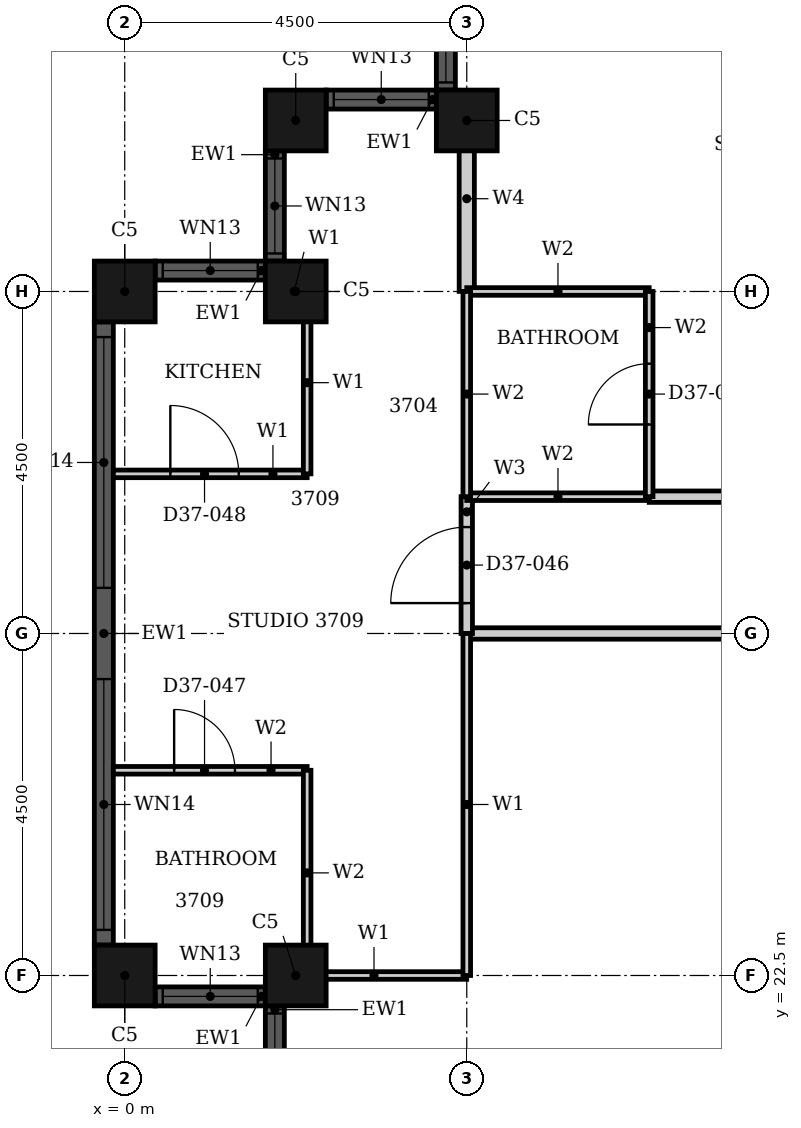
"""IFC4 building model, lengths in metres.
Left out: names, types, materials, properties, quantities, classifications, styles, units other than length and angle.
Written with IfcOpenShell. Run it as: python <this file> out.ifc"""

import sys

from ifc_helpers import new_model, si_unit, direction, frame, frame_2d, origin, origin_2d, place, context, subcontext, project, spatial, rectangle, hollow_rectangle, extrude, element, fill, save


model = new_model("IFC4")
c1 = context("Model", 3, precision=1e-05, world=origin(), true_north=direction((0.0, 1.0)))
c2 = subcontext(c1, "Body", "Model", "MODEL_VIEW")
j1 = project(units=[si_unit("LENGTHUNIT", "METRE"), si_unit("PLANEANGLEUNIT", "RADIAN")], contexts=[c1])
p1 = place(None, origin())
s1 = spatial("IfcSite", under=j1, at=p1, CompositionType="ELEMENT")
p2 = place(p1, origin())
s2 = spatial("IfcBuilding", under=s1, at=p2, CompositionType="ELEMENT")
p3 = place(p2, frame((0.0, 0.0, 150.6)))
s3 = spatial("IfcBuildingStorey", under=s2, at=p3, CompositionType="ELEMENT", Elevation=150.6)
for number, where, z_axis, x_axis in (
    (1, (4.5, 33.75, 0.0), (0.0, 0.0, 1.0), (1.0, 0.0, 0.0)),
    (2, (2.25, 33.75, 0.0), (0.0, 0.0, 1.0), (1.0, 0.0, 0.0)),
    (3, (2.25, 31.5, 0.0), (0.0, 0.0, 1.0), (1.0, 0.0, 0.0)),
    (4, (0.0, 31.5, 0.0), (0.0, 0.0, 1.0), (1.0, 0.0, 0.0)),
    (5, (0.0, 22.5, 0.0), (0.0, 0.0, 1.0), (1.0, 0.0, 0.0)),
    (6, (2.25, 22.5, 0.0), (0.0, 0.0, 1.0), (1.0, 0.0, 0.0)),
):
    element("IfcColumn", number, at=place(p3, frame(where, z_axis=z_axis, x_axis=x_axis)), inside=s3, PredefinedType="COLUMN", context=c2, shape_type="SweptSolid", body=[
        extrude(hollow_rectangle(XDim=0.8, YDim=0.8, WallThickness=0.025, at=origin_2d()), origin(), (0.0, 0.0, 1.0), 3.7),
    ])
p4 = place(p3, frame((4.225, 35.6, 0.0), z_axis=(0.0, 0.0, 1.0), x_axis=(0.0, -1.0, 0.0)))
e7 = element("IfcWall", 7, at=p4, inside=s3, PredefinedType="SOLIDWALL", context=c2, shape_type="SweptSolid", body=[
    extrude(rectangle(XDim=1.45, YDim=0.25, at=frame_2d((0.725, 0.0))), origin(), (0.0, 0.0, 1.0), 3.7),
])
p5 = place(p4, frame((0.1, 0.0, 0.9)))
e8 = element("IfcOpeningElement", 8, at=p5, cuts=e7, PredefinedType="OPENING", context=c2, shape_type="SweptSolid", body=[
    extrude(rectangle(XDim=1.25, YDim=2.08, at=frame_2d((0.625, 1.04))), frame((0.0, 0.135, 0.0), z_axis=(0.0, -1.0, 0.0), x_axis=(1.0, 0.0, 0.0)), (0.0, 0.0, 1.0), 0.27),
])
p6 = place(p3, frame((4.1, 34.025, 0.0), z_axis=(0.0, 0.0, 1.0), x_axis=(-1.0, 0.0, 0.0)))
e9 = element("IfcWall", 9, at=p6, inside=s3, PredefinedType="SOLIDWALL", context=c2, shape_type="SweptSolid", body=[
    extrude(rectangle(XDim=1.45, YDim=0.25, at=frame_2d((0.725, 0.0))), origin(), (0.0, 0.0, 1.0), 3.7),
])
p7 = place(p6, frame((0.1, 0.0, 0.9)))
e10 = element("IfcOpeningElement", 10, at=p7, cuts=e9, PredefinedType="OPENING", context=c2, shape_type="SweptSolid", body=[
    extrude(rectangle(XDim=1.25, YDim=1.85, at=frame_2d((0.625, 0.925))), frame((0.0, 0.135, 0.0), z_axis=(0.0, -1.0, 0.0), x_axis=(1.0, 0.0, 0.0)), (0.0, 0.0, 1.0), 0.27),
])
p8 = place(p3, frame((1.975, 33.35, 0.0), z_axis=(0.0, 0.0, 1.0), x_axis=(0.0, -1.0, 0.0)))
e11 = element("IfcWall", 11, at=p8, inside=s3, PredefinedType="SOLIDWALL", context=c2, shape_type="SweptSolid", body=[
    extrude(rectangle(XDim=1.45, YDim=0.25, at=frame_2d((0.725, 0.0))), origin(), (0.0, 0.0, 1.0), 3.7),
])
p9 = place(p8, frame((0.1, 0.0, 0.9)))
e12 = element("IfcOpeningElement", 12, at=p9, cuts=e11, PredefinedType="OPENING", context=c2, shape_type="SweptSolid", body=[
    extrude(rectangle(XDim=1.25, YDim=1.85, at=frame_2d((0.625, 0.925))), frame((0.0, 0.135, 0.0), z_axis=(0.0, -1.0, 0.0), x_axis=(1.0, 0.0, 0.0)), (0.0, 0.0, 1.0), 0.27),
])
p10 = place(p3, frame((1.85, 31.775, 0.0), z_axis=(0.0, 0.0, 1.0), x_axis=(-1.0, 0.0, 0.0)))
e13 = element("IfcWall", 13, at=p10, inside=s3, PredefinedType="SOLIDWALL", context=c2, shape_type="SweptSolid", body=[
    extrude(rectangle(XDim=1.45, YDim=0.25, at=frame_2d((0.725, 0.0))), origin(), (0.0, 0.0, 1.0), 3.7),
])
p11 = place(p10, frame((0.1, 0.0, 0.9)))
e14 = element("IfcOpeningElement", 14, at=p11, cuts=e13, PredefinedType="OPENING", context=c2, shape_type="SweptSolid", body=[
    extrude(rectangle(XDim=1.25, YDim=1.85, at=frame_2d((0.625, 0.925))), frame((0.0, 0.135, 0.0), z_axis=(0.0, -1.0, 0.0), x_axis=(1.0, 0.0, 0.0)), (0.0, 0.0, 1.0), 0.27),
])
p12 = place(p3, frame((-0.275, 31.1, 0.0), z_axis=(0.0, 0.0, 1.0), x_axis=(0.0, -1.0, 0.0)))
e15 = element("IfcWall", 15, at=p12, inside=s3, PredefinedType="SOLIDWALL", context=c2, shape_type="SweptSolid", body=[
    extrude(rectangle(XDim=8.2, YDim=0.25, at=frame_2d((4.1, 0.0))), origin(), (0.0, 0.0, 1.0), 3.7),
])
p13 = place(p12, frame((0.2, 0.0, 0.45)))
e16 = element("IfcOpeningElement", 16, at=p13, cuts=e15, PredefinedType="OPENING", context=c2, shape_type="SweptSolid", body=[
    extrude(rectangle(XDim=3.3, YDim=2.53, at=frame_2d((1.65, 1.265))), frame((0.0, 0.135, 0.0), z_axis=(0.0, -1.0, 0.0), x_axis=(1.0, 0.0, 0.0)), (0.0, 0.0, 1.0), 0.27),
])
p14 = place(p12, frame((4.7, 0.0, 0.45)))
e17 = element("IfcOpeningElement", 17, at=p14, cuts=e15, PredefinedType="OPENING", context=c2, shape_type="SweptSolid", body=[
    extrude(rectangle(XDim=3.3, YDim=2.53, at=frame_2d((1.65, 1.265))), frame((0.0, 0.135, 0.0), z_axis=(0.0, -1.0, 0.0), x_axis=(1.0, 0.0, 0.0)), (0.0, 0.0, 1.0), 0.27),
])
p15 = place(p3, frame((0.4, 22.225, 0.0), z_axis=(0.0, 0.0, 1.0), x_axis=(1.0, 0.0, 0.0)))
e18 = element("IfcWall", 18, at=p15, inside=s3, PredefinedType="SOLIDWALL", context=c2, shape_type="SweptSolid", body=[
    extrude(rectangle(XDim=1.45, YDim=0.25, at=frame_2d((0.725, 0.0))), origin(), (0.0, 0.0, 1.0), 3.7),
])
p16 = place(p15, frame((0.1, 0.0, 0.9)))
e19 = element("IfcOpeningElement", 19, at=p16, cuts=e18, PredefinedType="OPENING", context=c2, shape_type="SweptSolid", body=[
    extrude(rectangle(XDim=1.25, YDim=1.85, at=frame_2d((0.625, 0.925))), frame((0.0, 0.135, 0.0), z_axis=(0.0, -1.0, 0.0), x_axis=(1.0, 0.0, 0.0)), (0.0, 0.0, 1.0), 0.27),
])
p17 = place(p3, frame((1.975, 22.1, 0.0), z_axis=(0.0, 0.0, 1.0), x_axis=(0.0, -1.0, 0.0)))
e20 = element("IfcWall", 20, at=p17, inside=s3, PredefinedType="SOLIDWALL", context=c2, shape_type="SweptSolid", body=[
    extrude(rectangle(XDim=1.45, YDim=0.25, at=frame_2d((0.725, 0.0))), origin(), (0.0, 0.0, 1.0), 3.7),
])
p18 = place(p17, frame((0.1, 0.0, 0.9)))
e21 = element("IfcOpeningElement", 21, at=p18, cuts=e20, PredefinedType="OPENING", context=c2, shape_type="SweptSolid", body=[
    extrude(rectangle(XDim=1.25, YDim=1.85, at=frame_2d((0.625, 0.925))), frame((0.0, 0.135, 0.0), z_axis=(0.0, -1.0, 0.0), x_axis=(1.0, 0.0, 0.0)), (0.0, 0.0, 1.0), 0.27),
])
p19 = place(p3, frame((4.5, 27.0, 0.0), z_axis=(0.0, 0.0, 1.0), x_axis=(1.0, 0.0, 0.0)))
e22 = element("IfcWall", 22, at=p19, inside=s3, PredefinedType="PARTITIONING", context=c2, shape_type="SweptSolid", body=[
    extrude(rectangle(XDim=13.5, YDim=0.15, at=frame_2d((6.75, 0.0))), origin(), (0.0, 0.0, 1.0), 2.68),
])
p20 = place(p19, frame((5.35, 0.0, 0.0)))
e23 = element("IfcOpeningElement", 23, at=p20, cuts=e22, PredefinedType="OPENING", context=c2, shape_type="SweptSolid", body=[
    extrude(rectangle(XDim=1.0, YDim=2.1, at=frame_2d((0.5, 1.05))), frame((0.0, 0.085, 0.0), z_axis=(0.0, -1.0, 0.0), x_axis=(1.0, 0.0, 0.0)), (0.0, 0.0, 1.0), 0.17),
])
p21 = place(p3, frame((6.9, 28.8, 0.0), z_axis=(0.0, 0.0, 1.0), x_axis=(1.0, 0.0, 0.0)))
e24 = element("IfcWall", 24, at=p21, inside=s3, PredefinedType="PARTITIONING", context=c2, shape_type="SweptSolid", body=[
    extrude(rectangle(XDim=9.299, YDim=0.15, at=frame_2d((4.649, 0.0))), origin(), (0.0, 0.0, 1.0), 3.4),
])
p22 = place(p3, frame((4.5, 27.0, 0.0), z_axis=(0.0, 0.0, 1.0), x_axis=(0.0, 1.0, 0.0)))
e25 = element("IfcWall", 25, at=p22, inside=s3, PredefinedType="PARTITIONING", context=c2, shape_type="SweptSolid", body=[
    extrude(rectangle(XDim=1.8, YDim=0.15, at=frame_2d((0.9, 0.0))), origin(), (0.0, 0.0, 1.0), 3.4),
])
p23 = place(p22, frame((0.4, 0.0, 0.0)))
e26 = element("IfcOpeningElement", 26, at=p23, cuts=e25, PredefinedType="OPENING", context=c2, shape_type="SweptSolid", body=[
    extrude(rectangle(XDim=1.0, YDim=2.2, at=frame_2d((0.5, 1.1))), frame((0.0, 0.085, 0.0), z_axis=(0.0, -1.0, 0.0), x_axis=(1.0, 0.0, 0.0)), (0.0, 0.0, 1.0), 0.17),
])
p24 = place(p3, frame((2.06, 22.5, 0.0), z_axis=(0.0, 0.0, 1.0), x_axis=(1.0, 0.0, 0.0)))
e27 = element("IfcWall", 27, at=p24, inside=s3, PredefinedType="PARTITIONING", context=c2, shape_type="SweptSolid", body=[
    extrude(rectangle(XDim=2.439, YDim=0.1, at=frame_2d((1.219, 0.0))), origin(), (0.0, 0.0, 1.0), 2.68),
])
p25 = place(p3, frame((-0.15, 29.1, 0.0), z_axis=(0.0, 0.0, 1.0), x_axis=(1.0, 0.0, 0.0)))
e28 = element("IfcWall", 28, at=p25, inside=s3, PredefinedType="PARTITIONING", context=c2, shape_type="SweptSolid", body=[
    extrude(rectangle(XDim=2.55, YDim=0.1, at=frame_2d((1.275, 0.0))), origin(), (0.0, 0.0, 1.0), 3.4),
])
p26 = place(p25, frame((0.75, 0.0, 0.0)))
e29 = element("IfcOpeningElement", 29, at=p26, cuts=e28, PredefinedType="OPENING", context=c2, shape_type="SweptSolid", body=[
    extrude(rectangle(XDim=0.9, YDim=2.1, at=frame_2d((0.45, 1.05))), frame((0.0, 0.06, 0.0), z_axis=(0.0, -1.0, 0.0), x_axis=(1.0, 0.0, 0.0)), (0.0, 0.0, 1.0), 0.12),
])
p27 = place(p3, frame((2.06, 31.5, 0.0), z_axis=(0.0, 0.0, 1.0), x_axis=(1.0, 0.0, 0.0)))
e30 = element("IfcWall", 30, at=p27, inside=s3, PredefinedType="PARTITIONING", context=c2, shape_type="SweptSolid", body=[
    extrude(rectangle(XDim=0.34, YDim=0.1, at=frame_2d((0.17, 0.0))), origin(), (0.0, 0.0, 1.0), 3.4),
])
p28 = place(p3, frame((2.4, 29.1, 0.0), z_axis=(0.0, 0.0, 1.0), x_axis=(0.0, 1.0, 0.0)))
e31 = element("IfcWall", 31, at=p28, inside=s3, PredefinedType="PARTITIONING", context=c2, shape_type="SweptSolid", body=[
    extrude(rectangle(XDim=2.4, YDim=0.1, at=frame_2d((1.2, 0.0))), origin(), (0.0, 0.0, 1.0), 3.4),
])
p29 = place(p3, frame((4.5, 22.5, 0.0), z_axis=(0.0, 0.0, 1.0), x_axis=(0.0, 1.0, 0.0)))
e32 = element("IfcWall", 32, at=p29, inside=s3, PredefinedType="PARTITIONING", context=c2, shape_type="SweptSolid", body=[
    extrude(rectangle(XDim=4.5, YDim=0.1, at=frame_2d((2.25, 0.0))), origin(), (0.0, 0.0, 1.0), 3.4),
])
p30 = place(p3, frame((4.5, 31.501, 0.0), z_axis=(0.0, 0.0, 1.0), x_axis=(0.0, 1.0, 0.0)))
e33 = element("IfcWall", 33, at=p30, inside=s3, PredefinedType="PARTITIONING", context=c2, shape_type="SweptSolid", body=[
    extrude(rectangle(XDim=2.439, YDim=0.2, at=frame_2d((1.219, 0.0))), origin(), (0.0, 0.0, 1.0), 3.4),
])
p31 = place(p3, frame((-0.15, 25.2, 0.0), z_axis=(0.0, 0.0, 1.0), x_axis=(1.0, 0.0, 0.0)))
e34 = element("IfcWall", 34, at=p31, inside=s3, PredefinedType="PARTITIONING", context=c2, shape_type="SweptSolid", body=[
    extrude(rectangle(XDim=2.55, YDim=0.1, at=frame_2d((1.275, 0.0))), origin(), (0.0, 0.0, 1.0), 3.4),
])
p32 = place(p31, frame((0.8, 0.0, 0.0)))
e35 = element("IfcOpeningElement", 35, at=p32, cuts=e34, PredefinedType="OPENING", context=c2, shape_type="SweptSolid", body=[
    extrude(rectangle(XDim=0.8, YDim=2.1, at=frame_2d((0.4, 1.05))), frame((0.0, 0.06, 0.0), z_axis=(0.0, -1.0, 0.0), x_axis=(1.0, 0.0, 0.0)), (0.0, 0.0, 1.0), 0.12),
])
p33 = place(p3, frame((4.5, 28.8, 0.0), z_axis=(0.0, 0.0, 1.0), x_axis=(1.0, 0.0, 0.0)))
e36 = element("IfcWall", 36, at=p33, inside=s3, PredefinedType="PARTITIONING", context=c2, shape_type="SweptSolid", body=[
    extrude(rectangle(XDim=2.4, YDim=0.1, at=frame_2d((1.2, 0.0))), origin(), (0.0, 0.0, 1.0), 3.4),
])
p34 = place(p3, frame((4.5, 31.5, 0.0), z_axis=(0.0, 0.0, 1.0), x_axis=(1.0, 0.0, 0.0)))
e37 = element("IfcWall", 37, at=p34, inside=s3, PredefinedType="PARTITIONING", context=c2, shape_type="SweptSolid", body=[
    extrude(rectangle(XDim=2.4, YDim=0.1, at=frame_2d((1.2, 0.0))), origin(), (0.0, 0.0, 1.0), 2.68),
])
for number, where, z_axis, x_axis in (
    (38, (2.4, 22.5, 0.0), (0.0, 0.0, 1.0), (0.0, 1.0, 0.0)),
    (39, (4.5, 28.8, 0.0), (0.0, 0.0, 1.0), (0.0, 1.0, 0.0)),
):
    element("IfcWall", number, at=place(p3, frame(where, z_axis=z_axis, x_axis=x_axis)), inside=s3, PredefinedType="PARTITIONING", context=c2, shape_type="SweptSolid", body=[
        extrude(rectangle(XDim=2.7, YDim=0.1, at=frame_2d((1.35, 0.0))), origin(), (0.0, 0.0, 1.0), 3.4),
    ])
p35 = place(p3, frame((6.9, 28.8, 0.0), z_axis=(0.0, 0.0, 1.0), x_axis=(0.0, 1.0, 0.0)))
e40 = element("IfcWall", 40, at=p35, inside=s3, PredefinedType="PARTITIONING", context=c2, shape_type="SweptSolid", body=[
    extrude(rectangle(XDim=2.7, YDim=0.1, at=frame_2d((1.35, 0.0))), origin(), (0.0, 0.0, 1.0), 3.4),
])
p36 = place(p35, frame((0.95, 0.0, 0.0)))
e41 = element("IfcOpeningElement", 41, at=p36, cuts=e40, PredefinedType="OPENING", context=c2, shape_type="SweptSolid", body=[
    extrude(rectangle(XDim=0.8, YDim=2.1, at=frame_2d((0.4, 1.05))), frame((0.0, 0.06, 0.0), z_axis=(0.0, -1.0, 0.0), x_axis=(1.0, 0.0, 0.0)), (0.0, 0.0, 1.0), 0.12),
])
p37 = place(p5, origin())
e42 = element("IfcWindow", 42, at=p37, inside=s3, PartitioningType="SINGLE_PANEL", PredefinedType="WINDOW", context=c2, shape_type="SweptSolid", body=[
    extrude(rectangle(XDim=1.25, YDim=2.08, at=frame_2d((0.625, 1.04))), frame((0.0, 0.03, 0.0), z_axis=(0.0, -1.0, 0.0), x_axis=(1.0, 0.0, 0.0)), (0.0, 0.0, 1.0), 0.06),
])
fill(e8, e42)
p38 = place(p7, origin())
e43 = element("IfcWindow", 43, at=p38, inside=s3, PartitioningType="SINGLE_PANEL", PredefinedType="WINDOW", context=c2, shape_type="SweptSolid", body=[
    extrude(rectangle(XDim=1.25, YDim=1.85, at=frame_2d((0.625, 0.925))), frame((0.0, 0.03, 0.0), z_axis=(0.0, -1.0, 0.0), x_axis=(1.0, 0.0, 0.0)), (0.0, 0.0, 1.0), 0.06),
])
fill(e10, e43)
p39 = place(p9, origin())
e44 = element("IfcWindow", 44, at=p39, inside=s3, PartitioningType="SINGLE_PANEL", PredefinedType="WINDOW", context=c2, shape_type="SweptSolid", body=[
    extrude(rectangle(XDim=1.25, YDim=1.85, at=frame_2d((0.625, 0.925))), frame((0.0, 0.03, 0.0), z_axis=(0.0, -1.0, 0.0), x_axis=(1.0, 0.0, 0.0)), (0.0, 0.0, 1.0), 0.06),
])
fill(e12, e44)
p40 = place(p11, origin())
e45 = element("IfcWindow", 45, at=p40, inside=s3, PartitioningType="SINGLE_PANEL", PredefinedType="WINDOW", context=c2, shape_type="SweptSolid", body=[
    extrude(rectangle(XDim=1.25, YDim=1.85, at=frame_2d((0.625, 0.925))), frame((0.0, 0.03, 0.0), z_axis=(0.0, -1.0, 0.0), x_axis=(1.0, 0.0, 0.0)), (0.0, 0.0, 1.0), 0.06),
])
fill(e14, e45)
p41 = place(p13, origin())
e46 = element("IfcWindow", 46, at=p41, inside=s3, PartitioningType="SINGLE_PANEL", PredefinedType="WINDOW", context=c2, shape_type="SweptSolid", body=[
    extrude(rectangle(XDim=3.3, YDim=2.53, at=frame_2d((1.65, 1.265))), frame((0.0, 0.03, 0.0), z_axis=(0.0, -1.0, 0.0), x_axis=(1.0, 0.0, 0.0)), (0.0, 0.0, 1.0), 0.06),
])
fill(e16, e46)
p42 = place(p14, origin())
e47 = element("IfcWindow", 47, at=p42, inside=s3, PartitioningType="SINGLE_PANEL", PredefinedType="WINDOW", context=c2, shape_type="SweptSolid", body=[
    extrude(rectangle(XDim=3.3, YDim=2.53, at=frame_2d((1.65, 1.265))), frame((0.0, 0.03, 0.0), z_axis=(0.0, -1.0, 0.0), x_axis=(1.0, 0.0, 0.0)), (0.0, 0.0, 1.0), 0.06),
])
fill(e17, e47)
p43 = place(p16, origin())
e48 = element("IfcWindow", 48, at=p43, inside=s3, PartitioningType="SINGLE_PANEL", PredefinedType="WINDOW", context=c2, shape_type="SweptSolid", body=[
    extrude(rectangle(XDim=1.25, YDim=1.85, at=frame_2d((0.625, 0.925))), frame((0.0, 0.03, 0.0), z_axis=(0.0, -1.0, 0.0), x_axis=(1.0, 0.0, 0.0)), (0.0, 0.0, 1.0), 0.06),
])
fill(e19, e48)
p44 = place(p18, origin())
e49 = element("IfcWindow", 49, at=p44, inside=s3, PartitioningType="SINGLE_PANEL", PredefinedType="WINDOW", context=c2, shape_type="SweptSolid", body=[
    extrude(rectangle(XDim=1.25, YDim=1.85, at=frame_2d((0.625, 0.925))), frame((0.0, 0.03, 0.0), z_axis=(0.0, -1.0, 0.0), x_axis=(1.0, 0.0, 0.0)), (0.0, 0.0, 1.0), 0.06),
])
fill(e21, e49)
p45 = place(p36, origin())
e50 = element("IfcDoor", 50, at=p45, inside=s3, OperationType="SINGLE_SWING_RIGHT", PredefinedType="DOOR", context=c2, shape_type="SweptSolid", body=[
    extrude(rectangle(XDim=0.8, YDim=2.1, at=frame_2d((0.4, 1.05))), frame((0.0, 0.025, 0.0), z_axis=(0.0, -1.0, 0.0), x_axis=(1.0, 0.0, 0.0)), (0.0, 0.0, 1.0), 0.05),
])
fill(e41, e50)
p46 = place(p23, origin())
e51 = element("IfcDoor", 51, at=p46, inside=s3, OperationType="SINGLE_SWING_RIGHT", PredefinedType="DOOR", context=c2, shape_type="SweptSolid", body=[
    extrude(rectangle(XDim=1.0, YDim=2.2, at=frame_2d((0.5, 1.1))), frame((0.0, 0.025, 0.0), z_axis=(0.0, -1.0, 0.0), x_axis=(1.0, 0.0, 0.0)), (0.0, 0.0, 1.0), 0.05),
])
fill(e26, e51)
p47 = place(p32, origin())
e52 = element("IfcDoor", 52, at=p47, inside=s3, OperationType="SINGLE_SWING_RIGHT", PredefinedType="DOOR", context=c2, shape_type="SweptSolid", body=[
    extrude(rectangle(XDim=0.8, YDim=2.1, at=frame_2d((0.4, 1.05))), frame((0.0, 0.025, 0.0), z_axis=(0.0, -1.0, 0.0), x_axis=(1.0, 0.0, 0.0)), (0.0, 0.0, 1.0), 0.05),
])
fill(e35, e52)
p48 = place(p26, origin())
e53 = element("IfcDoor", 53, at=p48, inside=s3, OperationType="SINGLE_SWING_RIGHT", PredefinedType="DOOR", context=c2, shape_type="SweptSolid", body=[
    extrude(rectangle(XDim=0.9, YDim=2.1, at=frame_2d((0.45, 1.05))), frame((0.0, 0.025, 0.0), z_axis=(0.0, -1.0, 0.0), x_axis=(1.0, 0.0, 0.0)), (0.0, 0.0, 1.0), 0.05),
])
fill(e29, e53)
save(model, sys.argv[1])
